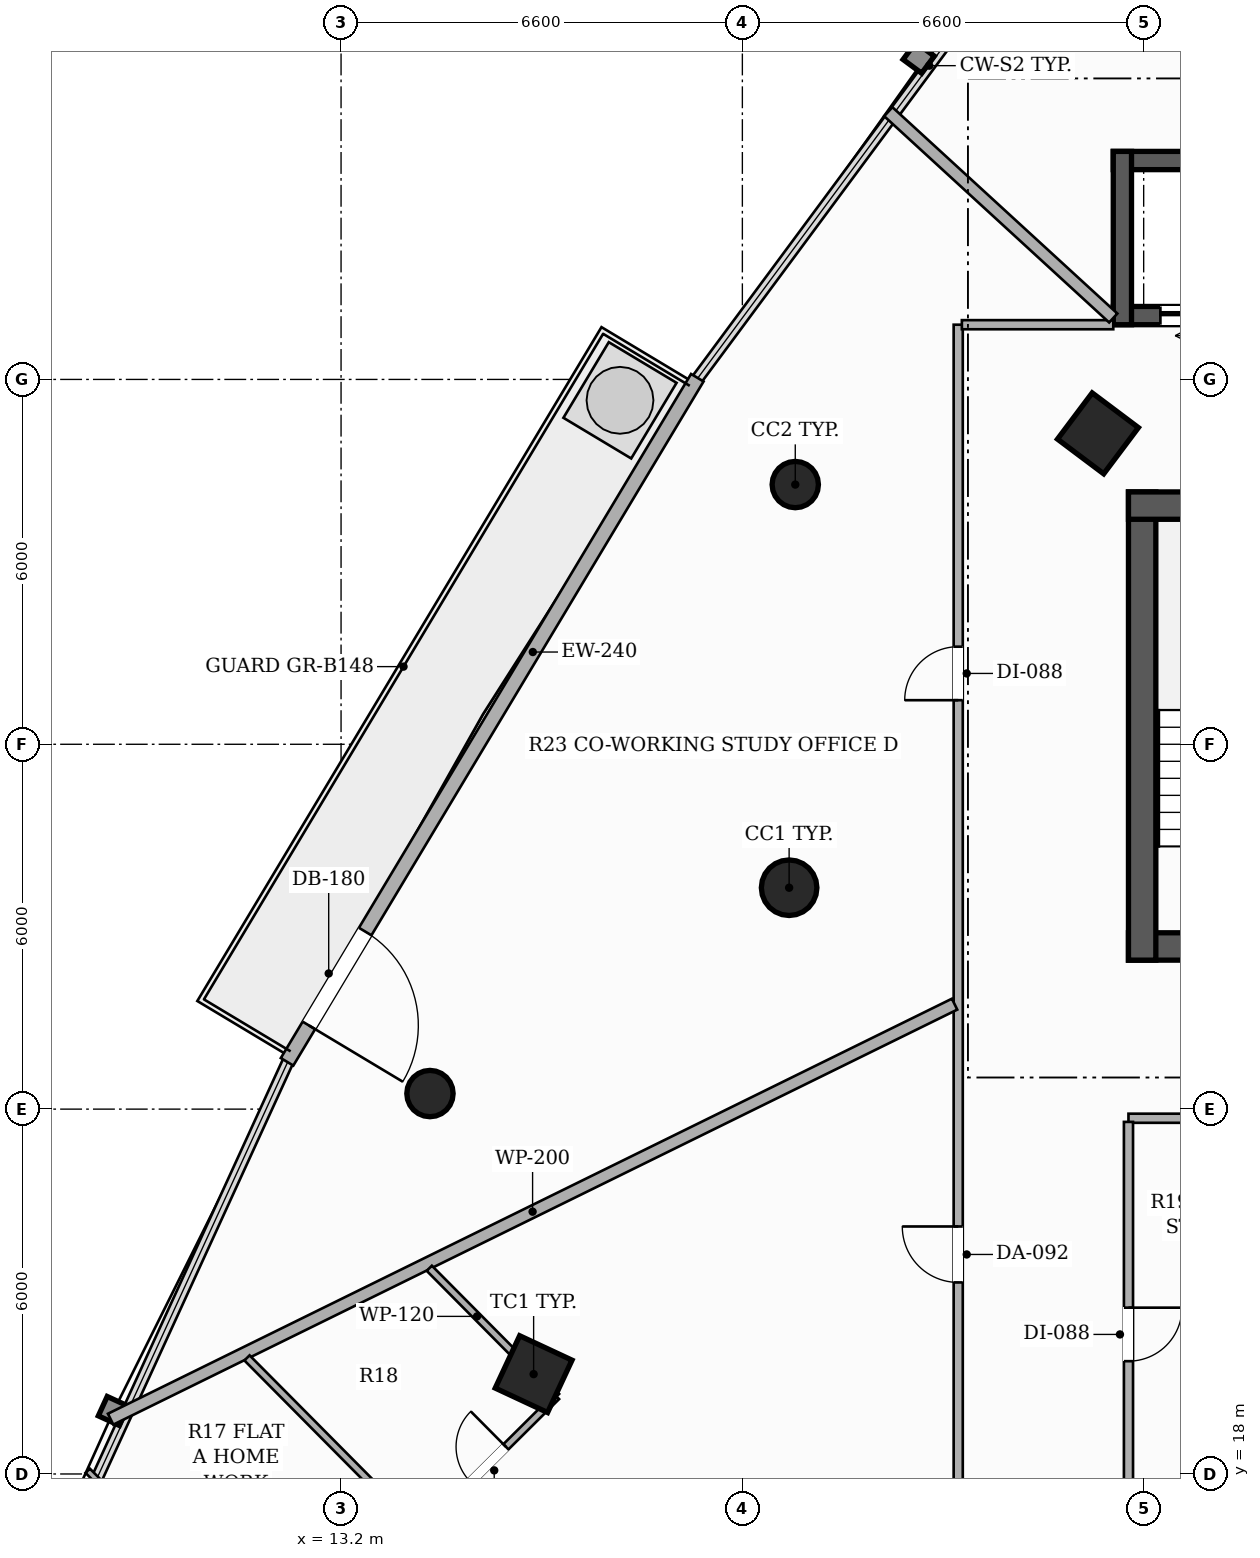
"""IFC4 building model, lengths in metres.
Left out: names, types, materials, properties, quantities, classifications, styles, units other than length and angle.
Written with IfcOpenShell. Run it as: python <this file> out.ifc"""

import sys

from ifc_helpers import new_model, si_unit, direction, frame, frame_2d, origin, origin_2d, place, context, subcontext, project, spatial, rectangle, hollow_rectangle, hollow_circle, extrude, element, fill, save


model = new_model("IFC4")
c1 = context("Model", 3, precision=1e-05, world=origin(), true_north=direction((0.0, 1.0)))
c2 = subcontext(c1, "Body", "Model", "MODEL_VIEW")
j1 = project(units=[si_unit("LENGTHUNIT", "METRE"), si_unit("PLANEANGLEUNIT", "RADIAN")], contexts=[c1])
p1 = place(None, origin())
s1 = spatial("IfcSite", under=j1, at=p1, CompositionType="ELEMENT")
p2 = place(p1, origin())
s2 = spatial("IfcBuilding", under=s1, at=p2, CompositionType="ELEMENT")
p3 = place(p2, frame((0.0, 0.0, 40.1)))
s3 = spatial("IfcBuildingStorey", under=s2, at=p3, CompositionType="ELEMENT", Elevation=40.1)
p4 = place(p3, frame((26.15, 26.675, 0.0), z_axis=(0.0, 0.0, 1.0), x_axis=(1.0, 0.0, 0.0)))
e1 = element("IfcWall", 1, at=p4, inside=s3, PredefinedType="SHEAR", context=c2, shape_type="SweptSolid", body=[
    extrude(rectangle(XDim=13.7, YDim=0.45, at=frame_2d((6.85, 0.0))), origin(), (0.0, 0.0, 1.0), 3.3),
])
p5 = place(p4, frame((4.35, 0.0, 0.0)))
e2 = element("IfcOpeningElement", 2, at=p5, cuts=e1, PredefinedType="OPENING", context=c2, shape_type="SweptSolid", body=[
    extrude(rectangle(XDim=1.05, YDim=2.15, at=frame_2d((0.525, 1.075))), frame((0.0, 0.235, 0.0), z_axis=(0.0, -1.0, 0.0), x_axis=(1.0, 0.0, 0.0)), (0.0, 0.0, 1.0), 0.47),
])
p6 = place(p4, frame((8.3, 0.0, 0.0)))
e3 = element("IfcOpeningElement", 3, at=p6, cuts=e1, PredefinedType="OPENING", context=c2, shape_type="SweptSolid", body=[
    extrude(rectangle(XDim=1.05, YDim=2.15, at=frame_2d((0.525, 1.075))), frame((0.0, 0.235, 0.0), z_axis=(0.0, -1.0, 0.0), x_axis=(1.0, 0.0, 0.0)), (0.0, 0.0, 1.0), 0.47),
])
p7 = place(p3, frame((26.375, 26.45, 0.0), z_axis=(0.0, 0.0, 1.0), x_axis=(0.0, 1.0, 0.0)))
e4 = element("IfcWall", 4, at=p7, inside=s3, PredefinedType="SHEAR", context=c2, shape_type="SweptSolid", body=[
    extrude(rectangle(XDim=7.7, YDim=0.45, at=frame_2d((3.85, 0.0))), origin(), (0.0, 0.0, 1.0), 3.3),
])
p8 = place(p3, frame((26.15, 33.925, 0.0), z_axis=(0.0, 0.0, 1.0), x_axis=(1.0, 0.0, 0.0)))
e5 = element("IfcWall", 5, at=p8, inside=s3, PredefinedType="SHEAR", context=c2, shape_type="SweptSolid", body=[
    extrude(rectangle(XDim=3.75, YDim=0.45, at=frame_2d((1.875, 0.0))), origin(), (0.0, 0.0, 1.0), 3.3),
])
p9 = place(p3, frame((40.1, 37.05, 0.0), z_axis=(0.0, 0.0, 1.0), x_axis=(-1.0, 0.0, 0.0)))
e6 = element("IfcWall", 6, at=p9, inside=s3, PredefinedType="SHEAR", context=c2, shape_type="SweptSolid", body=[
    extrude(rectangle(XDim=14.2, YDim=0.3, at=frame_2d((7.1, 0.0))), origin(), (0.0, 0.0, 1.0), 3.3),
])
p10 = place(p9, frame((12.325, 0.0, 0.0)))
e7 = element("IfcOpeningElement", 7, at=p10, cuts=e6, PredefinedType="OPENING", context=c2, shape_type="SweptSolid", body=[
    extrude(rectangle(XDim=1.1, YDim=2.2, at=frame_2d((0.55, 1.1))), frame((0.0, 0.16, 0.0), z_axis=(0.0, -1.0, 0.0), x_axis=(1.0, 0.0, 0.0)), (0.0, 0.0, 1.0), 0.32),
])
p11 = place(p9, frame((0.775, 0.0, 0.0)))
e8 = element("IfcOpeningElement", 8, at=p11, cuts=e6, PredefinedType="OPENING", context=c2, shape_type="SweptSolid", body=[
    extrude(rectangle(XDim=1.1, YDim=2.2, at=frame_2d((0.55, 1.1))), frame((0.0, 0.16, 0.0), z_axis=(0.0, -1.0, 0.0), x_axis=(1.0, 0.0, 0.0)), (0.0, 0.0, 1.0), 0.32),
])
p12 = place(p3, frame((25.9, 39.6, 0.0), z_axis=(0.0, 0.0, 1.0), x_axis=(1.0, 0.0, 0.0)))
e9 = element("IfcWall", 9, at=p12, inside=s3, PredefinedType="SHEAR", context=c2, shape_type="SweptSolid", body=[
    extrude(rectangle(XDim=14.2, YDim=0.3, at=frame_2d((7.1, 0.0))), origin(), (0.0, 0.0, 1.0), 3.3),
])
p13 = place(p3, frame((26.05, 36.9, 0.0), z_axis=(0.0, 0.0, 1.0), x_axis=(0.0, 1.0, 0.0)))
e10 = element("IfcWall", 10, at=p13, inside=s3, PredefinedType="SHEAR", context=c2, shape_type="SweptSolid", body=[
    extrude(rectangle(XDim=2.85, YDim=0.3, at=frame_2d((1.425, 0.0))), origin(), (0.0, 0.0, 1.0), 3.3),
])
p14 = place(p3, frame((25.648, 35.113, 0.0), z_axis=(0.0, 0.0, 1.0), x_axis=(0.600420225326, 0.799684658487, 0.0)))
e11 = element("IfcColumn", 11, at=p14, inside=s3, PredefinedType="COLUMN", context=c2, shape_type="SweptSolid", body=[
    extrude(hollow_rectangle(XDim=0.95, YDim=0.95, WallThickness=0.032, at=origin_2d()), origin(), (0.0, 0.0, 1.0), 3.3),
])
p15 = place(p3, frame((20.569, 27.641, 0.0), z_axis=(0.0, 0.0, 1.0), x_axis=(1.0, 0.0, 0.0)))
e12 = element("IfcColumn", 12, at=p15, inside=s3, PredefinedType="COLUMN", context=c2, shape_type="SweptSolid", body=[
    extrude(hollow_circle(Radius=0.457, WallThickness=0.025, at=origin_2d()), origin(), (0.0, 0.0, 1.0), 3.3),
])
p16 = place(p3, frame((16.367, 19.642, 0.0), z_axis=(0.0, 0.0, 1.0), x_axis=(0.422618261741, 0.906307787037, 0.0)))
e13 = element("IfcColumn", 13, at=p16, inside=s3, PredefinedType="COLUMN", context=c2, shape_type="SweptSolid", body=[
    extrude(hollow_rectangle(XDim=0.95, YDim=0.95, WallThickness=0.032, at=origin_2d()), origin(), (0.0, 0.0, 1.0), 3.3),
])
for number, where, z_axis, x_axis in (
    (14, (20.67, 34.271, 0.0), (0.0, 0.0, 1.0), (1.0, 0.0, 0.0)),
    (15, (14.662, 24.256, 0.0), (0.0, 0.0, 1.0), (1.0, 0.0, 0.0)),
):
    element("IfcColumn", number, at=place(p3, frame(where, z_axis=z_axis, x_axis=x_axis)), inside=s3, PredefinedType="COLUMN", context=c2, shape_type="SweptSolid", body=[
        extrude(hollow_circle(Radius=0.381, WallThickness=0.022, at=origin_2d()), origin(), (0.0, 0.0, 1.0), 3.3),
    ])
p17 = place(p3, frame((19.059, 36.028, 0.0), z_axis=(0.0, 0.0, 1.0), x_axis=(-0.514331531946, -0.857591438417, 0.0)))
e16 = element("IfcWall", 16, at=p17, inside=s3, PredefinedType="SOLIDWALL", context=c2, shape_type="SweptSolid", body=[
    extrude(rectangle(XDim=13.118, YDim=0.24, at=frame_2d((6.559, 0.0))), origin(), (0.0, 0.0, 1.0), 2.624),
])
p18 = place(p17, frame((10.62, 0.0, 0.0)))
e17 = element("IfcOpeningElement", 17, at=p18, cuts=e16, PredefinedType="OPENING", context=c2, shape_type="SweptSolid", body=[
    extrude(rectangle(XDim=1.8, YDim=2.2, at=frame_2d((0.9, 1.1))), frame((0.0, 0.13, 0.0), z_axis=(0.0, -1.0, 0.0), x_axis=(1.0, 0.0, 0.0)), (0.0, 0.0, 1.0), 0.26),
])
p19 = place(p3, frame((23.35, 11.86, 0.0), z_axis=(0.0, 0.0, 1.0), x_axis=(0.0, 1.0, 0.0)))
e18 = element("IfcWall", 18, at=p19, inside=s3, PredefinedType="PARTITIONING", context=c2, shape_type="SweptSolid", body=[
    extrude(rectangle(XDim=25.04, YDim=0.15, at=frame_2d((12.52, 0.0))), origin(), (0.0, 0.0, 1.0), 2.413),
])
p20 = place(p19, frame((9.29, 0.0, 0.0)))
e19 = element("IfcOpeningElement", 19, at=p20, cuts=e18, PredefinedType="OPENING", context=c2, shape_type="SweptSolid", body=[
    extrude(rectangle(XDim=0.92, YDim=2.15, at=frame_2d((0.46, 1.075))), frame((0.0, 0.085, 0.0), z_axis=(0.0, -1.0, 0.0), x_axis=(1.0, 0.0, 0.0)), (0.0, 0.0, 1.0), 0.17),
])
p21 = place(p19, frame((18.865, 0.0, 0.0)))
e20 = element("IfcOpeningElement", 20, at=p21, cuts=e18, PredefinedType="OPENING", context=c2, shape_type="SweptSolid", body=[
    extrude(rectangle(XDim=0.88, YDim=2.1, at=frame_2d((0.44, 1.05))), frame((0.0, 0.085, 0.0), z_axis=(0.0, -1.0, 0.0), x_axis=(1.0, 0.0, 0.0)), (0.0, 0.0, 1.0), 0.17),
])
p22 = place(p19, frame((2.566, 0.0, 0.0)))
e21 = element("IfcOpeningElement", 21, at=p22, cuts=e18, PredefinedType="OPENING", context=c2, shape_type="SweptSolid", body=[
    extrude(rectangle(XDim=0.92, YDim=2.15, at=frame_2d((0.46, 1.075))), frame((0.0, 0.085, 0.0), z_axis=(0.0, -1.0, 0.0), x_axis=(1.0, 0.0, 0.0)), (0.0, 0.0, 1.0), 0.17),
])
p23 = place(p3, frame((23.41, 36.9, 0.0), z_axis=(0.0, 0.0, 1.0), x_axis=(1.0, 0.0, 0.0)))
e22 = element("IfcWall", 22, at=p23, inside=s3, PredefinedType="PARTITIONING", context=c2, shape_type="SweptSolid", body=[
    extrude(rectangle(XDim=2.49, YDim=0.15, at=frame_2d((1.245, 0.0))), origin(), (0.0, 0.0, 1.0), 2.413),
])
p24 = place(p3, frame((31.545, 23.85, 0.0), z_axis=(0.0, 0.0, 1.0), x_axis=(-1.0, 0.0, 0.0)))
e23 = element("IfcWall", 23, at=p24, inside=s3, PredefinedType="PARTITIONING", context=c2, shape_type="SweptSolid", body=[
    extrude(rectangle(XDim=5.395, YDim=0.15, at=frame_2d((2.698, 0.0))), origin(), (0.0, 0.0, 1.0), 2.669),
])
p25 = place(p3, frame((26.15, 23.79, 0.0), z_axis=(0.0, 0.0, 1.0), x_axis=(0.0, -1.0, 0.0)))
e24 = element("IfcWall", 24, at=p25, inside=s3, PredefinedType="PARTITIONING", context=c2, shape_type="SweptSolid", body=[
    extrude(rectangle(XDim=6.99, YDim=0.15, at=frame_2d((3.495, 0.0))), origin(), (0.0, 0.0, 1.0), 2.669),
])
p26 = place(p25, frame((3.055, 0.0, 0.0)))
e25 = element("IfcOpeningElement", 25, at=p26, cuts=e24, PredefinedType="OPENING", context=c2, shape_type="SweptSolid", body=[
    extrude(rectangle(XDim=0.88, YDim=2.1, at=frame_2d((0.44, 1.05))), frame((0.0, 0.085, 0.0), z_axis=(0.0, -1.0, 0.0), x_axis=(1.0, 0.0, 0.0)), (0.0, 0.0, 1.0), 0.17),
])
p27 = place(p3, frame((9.41, 18.901, 0.0), z_axis=(0.0, 0.0, 1.0), x_axis=(0.89737804177, 0.44126256373, 0.0)))
e26 = element("IfcWall", 26, at=p27, inside=s3, PredefinedType="PARTITIONING", context=c2, shape_type="SweptSolid", body=[
    extrude(rectangle(XDim=15.468, YDim=0.2, at=frame_2d((7.734, 0.0))), origin(), (0.0, 0.0, 1.0), 2.413),
])
p28 = place(p3, frame((25.9, 37.01, 0.0), z_axis=(0.0, 0.0, 1.0), x_axis=(-0.737010798249, 0.675880968266, 0.0)))
e27 = element("IfcWall", 27, at=p28, inside=s3, PredefinedType="PARTITIONING", context=c2, shape_type="SweptSolid", body=[
    extrude(rectangle(XDim=5.02, YDim=0.2, at=frame_2d((2.51, 0.0))), origin(), (0.0, 0.0, 1.0), 3.06),
])
p29 = place(p3, frame((14.497, 17.043, 0.0), z_axis=(0.0, 0.0, 1.0), x_axis=(0.709608291954, 0.704596389425, 0.0)))
e28 = element("IfcWall", 28, at=p29, inside=s3, PredefinedType="PARTITIONING", context=c2, shape_type="SweptSolid", body=[
    extrude(rectangle(XDim=3.166, YDim=0.12, at=frame_2d((1.583, 0.0))), origin(), (0.0, 0.0, 1.0), 2.413),
])
p30 = place(p29, frame((1.173, 0.0, 0.0)))
e29 = element("IfcOpeningElement", 29, at=p30, cuts=e28, PredefinedType="OPENING", context=c2, shape_type="SweptSolid", body=[
    extrude(rectangle(XDim=0.82, YDim=2.1, at=frame_2d((0.41, 1.05))), frame((0.0, 0.07, 0.0), z_axis=(0.0, -1.0, 0.0), x_axis=(1.0, 0.0, 0.0)), (0.0, 0.0, 1.0), 0.14),
])
p31 = place(p3, frame((16.744, 19.274, 0.0), z_axis=(0.0, 0.0, 1.0), x_axis=(-0.704390177625, 0.709812987811, 0.0)))
e30 = element("IfcWall", 30, at=p31, inside=s3, PredefinedType="PARTITIONING", context=c2, shape_type="SweptSolid", body=[
    extrude(rectangle(XDim=2.971, YDim=0.12, at=frame_2d((1.486, 0.0))), origin(), (0.0, 0.0, 1.0), 2.413),
])
p32 = place(p3, frame((14.497, 17.043, 0.0), z_axis=(0.0, 0.0, 1.0), x_axis=(-0.704380529073, 0.70982256252, 0.0)))
e31 = element("IfcWall", 31, at=p32, inside=s3, PredefinedType="PARTITIONING", context=c2, shape_type="SweptSolid", body=[
    extrude(rectangle(XDim=4.038, YDim=0.12, at=frame_2d((2.019, 0.0))), origin(), (0.0, 0.0, 1.0), 2.413),
])
p33 = place(p3, frame((9.033, 18.053, 0.0), z_axis=(0.0, 0.0, 1.0), x_axis=(0.704374497722, -0.709828547579, 0.0)))
e32 = element("IfcWall", 32, at=p33, inside=s3, PredefinedType="PARTITIONING", context=c2, shape_type="SweptSolid", body=[
    extrude(rectangle(XDim=4.566, YDim=0.1, at=frame_2d((2.283, 0.0))), origin(), (0.0, 0.0, 1.0), 2.413),
])
p34 = place(p18, origin())
e33 = element("IfcDoor", 33, at=p34, inside=s3, OperationType="SINGLE_SWING_RIGHT", PredefinedType="DOOR", context=c2, shape_type="SweptSolid", body=[
    extrude(rectangle(XDim=1.8, YDim=2.2, at=frame_2d((0.9, 1.1))), frame((0.0, 0.025, 0.0), z_axis=(0.0, -1.0, 0.0), x_axis=(1.0, 0.0, 0.0)), (0.0, 0.0, 1.0), 0.05),
])
fill(e17, e33)
p35 = place(p10, origin())
e34 = element("IfcDoor", 34, at=p35, inside=s3, OperationType="DOUBLE_DOOR_SLIDING", PredefinedType="DOOR", context=c2, shape_type="SweptSolid", body=[
    extrude(rectangle(XDim=1.1, YDim=2.2, at=frame_2d((0.55, 1.1))), frame((0.0, 0.025, 0.0), z_axis=(0.0, -1.0, 0.0), x_axis=(1.0, 0.0, 0.0)), (0.0, 0.0, 1.0), 0.05),
])
fill(e7, e34)
p36 = place(p20, origin())
e35 = element("IfcDoor", 35, at=p36, inside=s3, OperationType="SINGLE_SWING_RIGHT", PredefinedType="DOOR", context=c2, shape_type="SweptSolid", body=[
    extrude(rectangle(XDim=0.92, YDim=2.15, at=frame_2d((0.46, 1.075))), frame((0.0, 0.025, 0.0), z_axis=(0.0, -1.0, 0.0), x_axis=(1.0, 0.0, 0.0)), (0.0, 0.0, 1.0), 0.05),
])
fill(e19, e35)
p37 = place(p30, origin())
e36 = element("IfcDoor", 36, at=p37, inside=s3, OperationType="SINGLE_SWING_RIGHT", PredefinedType="DOOR", context=c2, shape_type="SweptSolid", body=[
    extrude(rectangle(XDim=0.82, YDim=2.1, at=frame_2d((0.41, 1.05))), frame((0.0, 0.025, 0.0), z_axis=(0.0, -1.0, 0.0), x_axis=(1.0, 0.0, 0.0)), (0.0, 0.0, 1.0), 0.05),
])
fill(e29, e36)
p38 = place(p21, origin())
e37 = element("IfcDoor", 37, at=p38, inside=s3, OperationType="SINGLE_SWING_LEFT", PredefinedType="DOOR", context=c2, shape_type="SweptSolid", body=[
    extrude(rectangle(XDim=0.88, YDim=2.1, at=frame_2d((0.44, 1.05))), frame((0.0, 0.025, 0.0), z_axis=(0.0, -1.0, 0.0), x_axis=(1.0, 0.0, 0.0)), (0.0, 0.0, 1.0), 0.05),
])
fill(e20, e37)
p39 = place(p26, origin())
e38 = element("IfcDoor", 38, at=p39, inside=s3, OperationType="SINGLE_SWING_LEFT", PredefinedType="DOOR", context=c2, shape_type="SweptSolid", body=[
    extrude(rectangle(XDim=0.88, YDim=2.1, at=frame_2d((0.44, 1.05))), frame((0.0, 0.025, 0.0), z_axis=(0.0, -1.0, 0.0), x_axis=(1.0, 0.0, 0.0)), (0.0, 0.0, 1.0), 0.05),
])
fill(e25, e38)
save(model, sys.argv[1])
